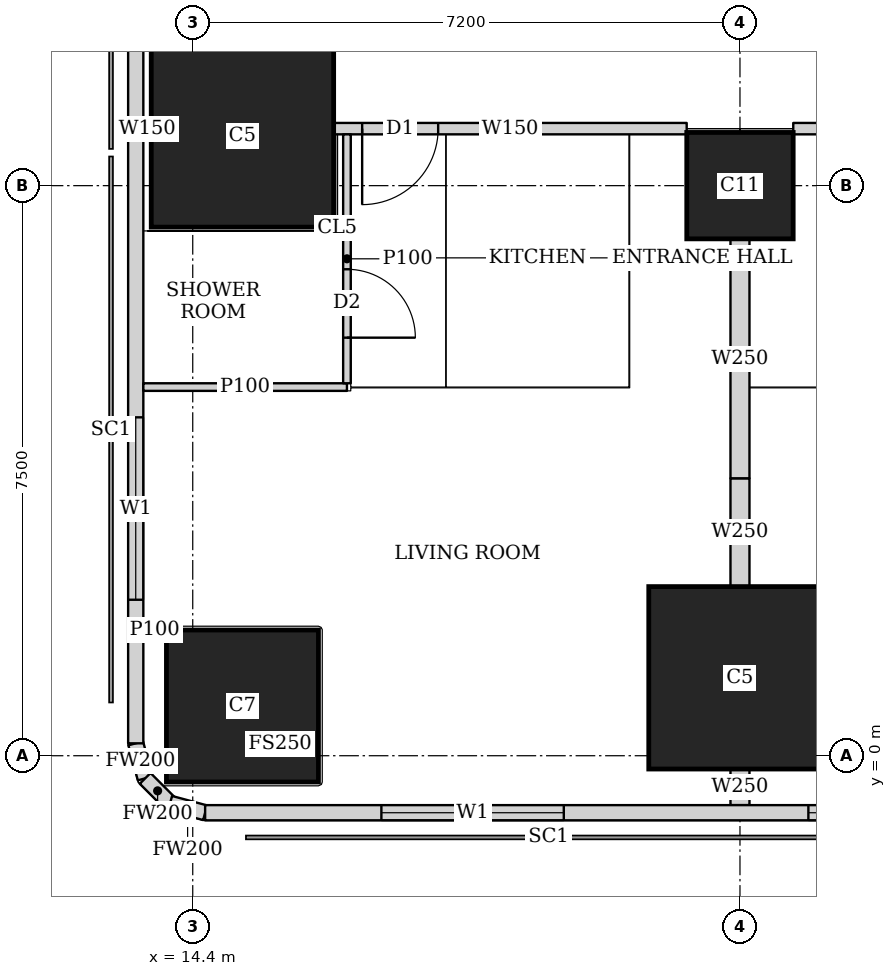
"""IFC4 building model, lengths in metres.
Left out: names, types, materials, properties, quantities, classifications, styles, units other than length and angle.
Written with IfcOpenShell. Run it as: python <this file> out.ifc"""

import sys

from ifc_helpers import new_model, si_unit, direction, frame, frame_2d, origin, origin_2d, place, context, subcontext, project, spatial, rectangle, extrude, element, fill, save


model = new_model("IFC4")
c1 = context("Model", 3, precision=1e-05, world=origin(), true_north=direction((0.0, 1.0)))
c2 = subcontext(c1, "Body", "Model", "MODEL_VIEW")
j1 = project(units=[si_unit("LENGTHUNIT", "METRE"), si_unit("PLANEANGLEUNIT", "RADIAN")], contexts=[c1])
p1 = place(None, origin())
s1 = spatial("IfcSite", under=j1, at=p1, CompositionType="ELEMENT")
p2 = place(p1, origin())
s2 = spatial("IfcBuilding", under=s1, at=p2, CompositionType="ELEMENT")
p3 = place(p2, frame((0.0, 0.0, 242.45)))
s3 = spatial("IfcBuildingStorey", under=s2, at=p3, CompositionType="ELEMENT", Elevation=242.45)
p4 = place(p3, frame((15.054, 0.654, 0.0), z_axis=(0.0, 0.0, 1.0), x_axis=(1.0, 0.0, 0.0)))
e1 = element("IfcColumn", 1, at=p4, inside=s3, PredefinedType="COLUMN", context=c2, shape_type="SweptSolid", body=[
    extrude(rectangle(XDim=2.0, YDim=2.0, at=origin_2d()), origin(), (0.0, 0.0, 1.0), 3.75),
])
for number, where, z_axis, x_axis in (
    (2, (21.6, 1.025, 0.0), (0.0, 0.0, 1.0), (1.0, 0.0, 0.0)),
    (3, (15.054, 8.154, 0.0), (0.0, 0.0, 1.0), (1.0, 0.0, 0.0)),
):
    element("IfcColumn", number, at=place(p3, frame(where, z_axis=z_axis, x_axis=x_axis)), inside=s3, PredefinedType="COLUMN", context=c2, shape_type="SweptSolid", body=[
        extrude(rectangle(XDim=2.4, YDim=2.4, at=origin_2d()), origin(), (0.0, 0.0, 1.0), 3.75),
    ])
p5 = place(p3, frame((21.6, 7.5, 0.0), z_axis=(0.0, 0.0, 1.0), x_axis=(1.0, 0.0, 0.0)))
e4 = element("IfcColumn", 4, at=p5, inside=s3, PredefinedType="COLUMN", context=c2, shape_type="SweptSolid", body=[
    extrude(rectangle(XDim=1.4, YDim=1.4, at=origin_2d()), origin(), (0.0, 0.0, 1.0), 3.75),
])
p6 = place(p3, frame((14.563, -0.75, 0.0), z_axis=(0.0, 0.0, 1.0), x_axis=(1.0, 0.0, 0.0)))
e5 = element("IfcWall", 5, at=p6, inside=s3, PredefinedType="SOLIDWALL", context=c2, shape_type="SweptSolid", body=[
    extrude(rectangle(XDim=33.228, YDim=0.2, at=frame_2d((16.614, 0.0))), origin(), (0.0, 0.0, 1.0), 3.45),
])
p7 = place(p6, frame((2.319, 0.0, 0.9)))
e6 = element("IfcOpeningElement", 6, at=p7, cuts=e5, PredefinedType="OPENING", context=c2, shape_type="SweptSolid", body=[
    extrude(rectangle(XDim=2.4, YDim=1.5, at=frame_2d((1.2, 0.75))), frame((0.0, 0.11, 0.0), z_axis=(0.0, -1.0, 0.0), x_axis=(1.0, 0.0, 0.0)), (0.0, 0.0, 1.0), 0.22),
])
p8 = place(p6, frame((7.937, 0.0, 0.9)))
e7 = element("IfcOpeningElement", 7, at=p8, cuts=e5, PredefinedType="OPENING", context=c2, shape_type="SweptSolid", body=[
    extrude(rectangle(XDim=1.8, YDim=1.5, at=frame_2d((0.9, 0.75))), frame((0.0, 0.11, 0.0), z_axis=(0.0, -1.0, 0.0), x_axis=(1.0, 0.0, 0.0)), (0.0, 0.0, 1.0), 0.22),
])
p9 = place(p6, frame((11.537, 0.0, 0.9)))
e8 = element("IfcOpeningElement", 8, at=p9, cuts=e5, PredefinedType="OPENING", context=c2, shape_type="SweptSolid", body=[
    extrude(rectangle(XDim=1.8, YDim=1.5, at=frame_2d((0.9, 0.75))), frame((0.0, 0.11, 0.0), z_axis=(0.0, -1.0, 0.0), x_axis=(1.0, 0.0, 0.0)), (0.0, 0.0, 1.0), 0.22),
])
p10 = place(p6, frame((15.137, 0.0, 0.9)))
e9 = element("IfcOpeningElement", 9, at=p10, cuts=e5, PredefinedType="OPENING", context=c2, shape_type="SweptSolid", body=[
    extrude(rectangle(XDim=1.8, YDim=1.5, at=frame_2d((0.9, 0.75))), frame((0.0, 0.11, 0.0), z_axis=(0.0, -1.0, 0.0), x_axis=(1.0, 0.0, 0.0)), (0.0, 0.0, 1.0), 0.22),
])
p11 = place(p6, frame((18.737, 0.0, 0.9)))
e10 = element("IfcOpeningElement", 10, at=p11, cuts=e5, PredefinedType="OPENING", context=c2, shape_type="SweptSolid", body=[
    extrude(rectangle(XDim=1.8, YDim=1.5, at=frame_2d((0.9, 0.75))), frame((0.0, 0.11, 0.0), z_axis=(0.0, -1.0, 0.0), x_axis=(1.0, 0.0, 0.0)), (0.0, 0.0, 1.0), 0.22),
])
p12 = place(p6, frame((22.337, 0.0, 0.9)))
e11 = element("IfcOpeningElement", 11, at=p12, cuts=e5, PredefinedType="OPENING", context=c2, shape_type="SweptSolid", body=[
    extrude(rectangle(XDim=1.8, YDim=1.5, at=frame_2d((0.9, 0.75))), frame((0.0, 0.11, 0.0), z_axis=(0.0, -1.0, 0.0), x_axis=(1.0, 0.0, 0.0)), (0.0, 0.0, 1.0), 0.22),
])
p13 = place(p6, frame((25.937, 0.0, 0.9)))
e12 = element("IfcOpeningElement", 12, at=p13, cuts=e5, PredefinedType="OPENING", context=c2, shape_type="SweptSolid", body=[
    extrude(rectangle(XDim=1.8, YDim=1.5, at=frame_2d((0.9, 0.75))), frame((0.0, 0.11, 0.0), z_axis=(0.0, -1.0, 0.0), x_axis=(1.0, 0.0, 0.0)), (0.0, 0.0, 1.0), 0.22),
])
p14 = place(p3, frame((13.65, 44.837, 0.0), z_axis=(0.0, 0.0, 1.0), x_axis=(0.0, -1.0, 0.0)))
e13 = element("IfcWall", 13, at=p14, inside=s3, PredefinedType="SOLIDWALL", context=c2, shape_type="SweptSolid", body=[
    extrude(rectangle(XDim=44.674, YDim=0.2, at=frame_2d((22.337, 0.0))), origin(), (0.0, 0.0, 1.0), 3.45),
])
p15 = place(p14, frame((1.889, 0.0, 0.9)))
e14 = element("IfcOpeningElement", 14, at=p15, cuts=e13, PredefinedType="OPENING", context=c2, shape_type="SweptSolid", body=[
    extrude(rectangle(XDim=2.4, YDim=1.5, at=frame_2d((1.2, 0.75))), frame((0.0, 0.11, 0.0), z_axis=(0.0, -1.0, 0.0), x_axis=(1.0, 0.0, 0.0)), (0.0, 0.0, 1.0), 0.22),
])
p16 = place(p14, frame((40.385, 0.0, 0.9)))
e15 = element("IfcOpeningElement", 15, at=p16, cuts=e13, PredefinedType="OPENING", context=c2, shape_type="SweptSolid", body=[
    extrude(rectangle(XDim=2.4, YDim=1.5, at=frame_2d((1.2, 0.75))), frame((0.0, 0.11, 0.0), z_axis=(0.0, -1.0, 0.0), x_axis=(1.0, 0.0, 0.0)), (0.0, 0.0, 1.0), 0.22),
])
p17 = place(p3, frame((13.65, 0.163, 0.0), z_axis=(0.0, 0.0, 1.0), x_axis=(0.259698463175, -0.965689757751, 0.0)))
e16 = element("IfcWall", 16, at=p17, inside=s3, PredefinedType="SOLIDWALL", context=c2, shape_type="SweptSolid", body=[
    extrude(rectangle(XDim=0.478, YDim=0.2, at=frame_2d((0.239, 0.0))), origin(), (0.0, 0.0, 1.0), 3.45),
])
p18 = place(p3, frame((13.774, -0.298, 0.0), z_axis=(0.0, 0.0, 1.0), x_axis=(0.707369890659, -0.706843573776, 0.0)))
e17 = element("IfcWall", 17, at=p18, inside=s3, PredefinedType="SOLIDWALL", context=c2, shape_type="SweptSolid", body=[
    extrude(rectangle(XDim=0.464, YDim=0.2, at=frame_2d((0.232, 0.0))), origin(), (0.0, 0.0, 1.0), 3.45),
])
p19 = place(p3, frame((14.102, -0.626, 0.0), z_axis=(0.0, 0.0, 1.0), x_axis=(0.965655254015, -0.259826731483, 0.0)))
e18 = element("IfcWall", 18, at=p19, inside=s3, PredefinedType="SOLIDWALL", context=c2, shape_type="SweptSolid", body=[
    extrude(rectangle(XDim=0.477, YDim=0.2, at=frame_2d((0.239, 0.0))), origin(), (0.0, 0.0, 1.0), 3.45),
])
p20 = place(p3, frame((28.099, 8.25, 0.0), z_axis=(0.0, 0.0, 1.0), x_axis=(-1.0, 0.0, 0.0)))
e19 = element("IfcWall", 19, at=p20, inside=s3, PredefinedType="SOLIDWALL", context=c2, shape_type="SweptSolid", body=[
    extrude(rectangle(XDim=5.798, YDim=0.15, at=frame_2d((2.899, 0.0))), origin(), (0.0, 0.0, 1.0), 3.45),
])
p21 = place(p20, frame((3.999, 0.0, 0.0)))
e20 = element("IfcOpeningElement", 20, at=p21, cuts=e19, PredefinedType="OPENING", context=c2, shape_type="SweptSolid", body=[
    extrude(rectangle(XDim=1.0, YDim=2.1, at=frame_2d((0.5, 1.05))), frame((0.0, 0.085, 0.0), z_axis=(0.0, -1.0, 0.0), x_axis=(1.0, 0.0, 0.0)), (0.0, 0.0, 1.0), 0.17),
])
p22 = place(p3, frame((20.899, 8.25, 0.0), z_axis=(0.0, 0.0, 1.0), x_axis=(-1.0, 0.0, 0.0)))
e21 = element("IfcWall", 21, at=p22, inside=s3, PredefinedType="SOLIDWALL", context=c2, shape_type="SweptSolid", body=[
    extrude(rectangle(XDim=4.644, YDim=0.15, at=frame_2d((2.322, 0.0))), origin(), (0.0, 0.0, 1.0), 3.45),
])
p23 = place(p22, frame((3.27, 0.0, 0.0)))
e22 = element("IfcOpeningElement", 22, at=p23, cuts=e21, PredefinedType="OPENING", context=c2, shape_type="SweptSolid", body=[
    extrude(rectangle(XDim=1.0, YDim=2.1, at=frame_2d((0.5, 1.05))), frame((0.0, 0.085, 0.0), z_axis=(0.0, -1.0, 0.0), x_axis=(1.0, 0.0, 0.0)), (0.0, 0.0, 1.0), 0.17),
])
p24 = place(p3, frame((13.853, 8.25, 0.0), z_axis=(0.0, 0.0, 1.0), x_axis=(-1.0, 0.0, 0.0)))
e23 = element("IfcWall", 23, at=p24, inside=s3, PredefinedType="SOLIDWALL", context=c2, shape_type="SweptSolid", body=[
    extrude(rectangle(XDim=0.103, YDim=0.15, at=frame_2d((0.052, 0.0))), origin(), (0.0, 0.0, 1.0), 3.45),
])
p25 = place(p3, frame((13.75, 1.654, 0.0), z_axis=(0.0, 0.0, 1.0), x_axis=(1.0, 0.0, 0.0)))
e24 = element("IfcWall", 24, at=p25, inside=s3, PredefinedType="PARTITIONING", context=c2, shape_type="SweptSolid", body=[
    extrude(rectangle(XDim=0.304, YDim=0.1, at=frame_2d((0.152, 0.0))), origin(), (0.0, 0.0, 1.0), 2.0),
])
p26 = place(p3, frame((16.429, 4.85, 0.0), z_axis=(0.0, 0.0, 1.0), x_axis=(-1.0, 0.0, 0.0)))
e25 = element("IfcWall", 25, at=p26, inside=s3, PredefinedType="PARTITIONING", context=c2, shape_type="SweptSolid", body=[
    extrude(rectangle(XDim=2.679, YDim=0.1, at=frame_2d((1.339, 0.0))), origin(), (0.0, 0.0, 1.0), 2.0),
])
p27 = place(p3, frame((16.429, 4.9, 0.0), z_axis=(0.0, 0.0, 1.0), x_axis=(0.0, 1.0, 0.0)))
e26 = element("IfcWall", 26, at=p27, inside=s3, PredefinedType="PARTITIONING", context=c2, shape_type="SweptSolid", body=[
    extrude(rectangle(XDim=3.275, YDim=0.1, at=frame_2d((1.638, 0.0))), origin(), (0.0, 0.0, 1.0), 3.45),
])
p28 = place(p27, frame((0.6, 0.0, 0.0)))
e27 = element("IfcOpeningElement", 27, at=p28, cuts=e26, PredefinedType="OPENING", context=c2, shape_type="SweptSolid", body=[
    extrude(rectangle(XDim=0.9, YDim=2.1, at=frame_2d((0.45, 1.05))), frame((0.0, 0.06, 0.0), z_axis=(0.0, -1.0, 0.0), x_axis=(1.0, 0.0, 0.0)), (0.0, 0.0, 1.0), 0.12),
])
p29 = place(p3, frame((21.6, -0.65, 0.0), z_axis=(0.0, 0.0, 1.0), x_axis=(0.0, 1.0, 0.0)))
e28 = element("IfcWall", 28, at=p29, inside=s3, PredefinedType="SOLIDWALL", context=c2, shape_type="SweptSolid", body=[
    extrude(rectangle(XDim=0.474, YDim=0.25, at=frame_2d((0.237, 0.0))), origin(), (0.0, 0.0, 1.0), 2.0),
])
p30 = place(p3, frame((21.6, 2.226, 0.0), z_axis=(0.0, 0.0, 1.0), x_axis=(0.0, 1.0, 0.0)))
e29 = element("IfcWall", 29, at=p30, inside=s3, PredefinedType="SOLIDWALL", context=c2, shape_type="SweptSolid", body=[
    extrude(rectangle(XDim=1.424, YDim=0.25, at=frame_2d((0.712, 0.0))), origin(), (0.0, 0.0, 1.0), 2.0),
])
p31 = place(p3, frame((21.6, 3.65, 0.0), z_axis=(0.0, 0.0, 1.0), x_axis=(0.0, 1.0, 0.0)))
e30 = element("IfcWall", 30, at=p31, inside=s3, PredefinedType="SOLIDWALL", context=c2, shape_type="SweptSolid", body=[
    extrude(rectangle(XDim=3.149, YDim=0.25, at=frame_2d((1.575, 0.0))), origin(), (0.0, 0.0, 1.0), 3.45),
])
p32 = place(p7, origin())
e31 = element("IfcWindow", 31, at=p32, inside=s3, PartitioningType="SINGLE_PANEL", PredefinedType="WINDOW", context=c2, shape_type="SweptSolid", body=[
    extrude(rectangle(XDim=2.4, YDim=1.5, at=frame_2d((1.2, 0.75))), frame((0.0, 0.03, 0.0), z_axis=(0.0, -1.0, 0.0), x_axis=(1.0, 0.0, 0.0)), (0.0, 0.0, 1.0), 0.06),
])
fill(e6, e31)
p33 = place(p8, origin())
e32 = element("IfcWindow", 32, at=p33, inside=s3, PartitioningType="SINGLE_PANEL", PredefinedType="WINDOW", context=c2, shape_type="SweptSolid", body=[
    extrude(rectangle(XDim=1.8, YDim=1.5, at=frame_2d((0.9, 0.75))), frame((0.0, 0.03, 0.0), z_axis=(0.0, -1.0, 0.0), x_axis=(1.0, 0.0, 0.0)), (0.0, 0.0, 1.0), 0.06),
])
fill(e7, e32)
p34 = place(p16, origin())
e33 = element("IfcWindow", 33, at=p34, inside=s3, PartitioningType="SINGLE_PANEL", PredefinedType="WINDOW", context=c2, shape_type="SweptSolid", body=[
    extrude(rectangle(XDim=2.4, YDim=1.5, at=frame_2d((1.2, 0.75))), frame((0.0, 0.03, 0.0), z_axis=(0.0, -1.0, 0.0), x_axis=(1.0, 0.0, 0.0)), (0.0, 0.0, 1.0), 0.06),
])
fill(e15, e33)
p35 = place(p28, origin())
e34 = element("IfcDoor", 34, at=p35, inside=s3, OperationType="SINGLE_SWING_RIGHT", PredefinedType="DOOR", context=c2, shape_type="SweptSolid", body=[
    extrude(rectangle(XDim=0.9, YDim=2.1, at=frame_2d((0.45, 1.05))), frame((0.0, 0.025, 0.0), z_axis=(0.0, -1.0, 0.0), x_axis=(1.0, 0.0, 0.0)), (0.0, 0.0, 1.0), 0.05),
])
fill(e27, e34)
p36 = place(p23, origin())
e35 = element("IfcDoor", 35, at=p36, inside=s3, OperationType="SINGLE_SWING_RIGHT", PredefinedType="DOOR", context=c2, shape_type="SweptSolid", body=[
    extrude(rectangle(XDim=1.0, YDim=2.1, at=frame_2d((0.5, 1.05))), frame((0.0, 0.025, 0.0), z_axis=(0.0, -1.0, 0.0), x_axis=(1.0, 0.0, 0.0)), (0.0, 0.0, 1.0), 0.05),
])
fill(e22, e35)
save(model, sys.argv[1])
